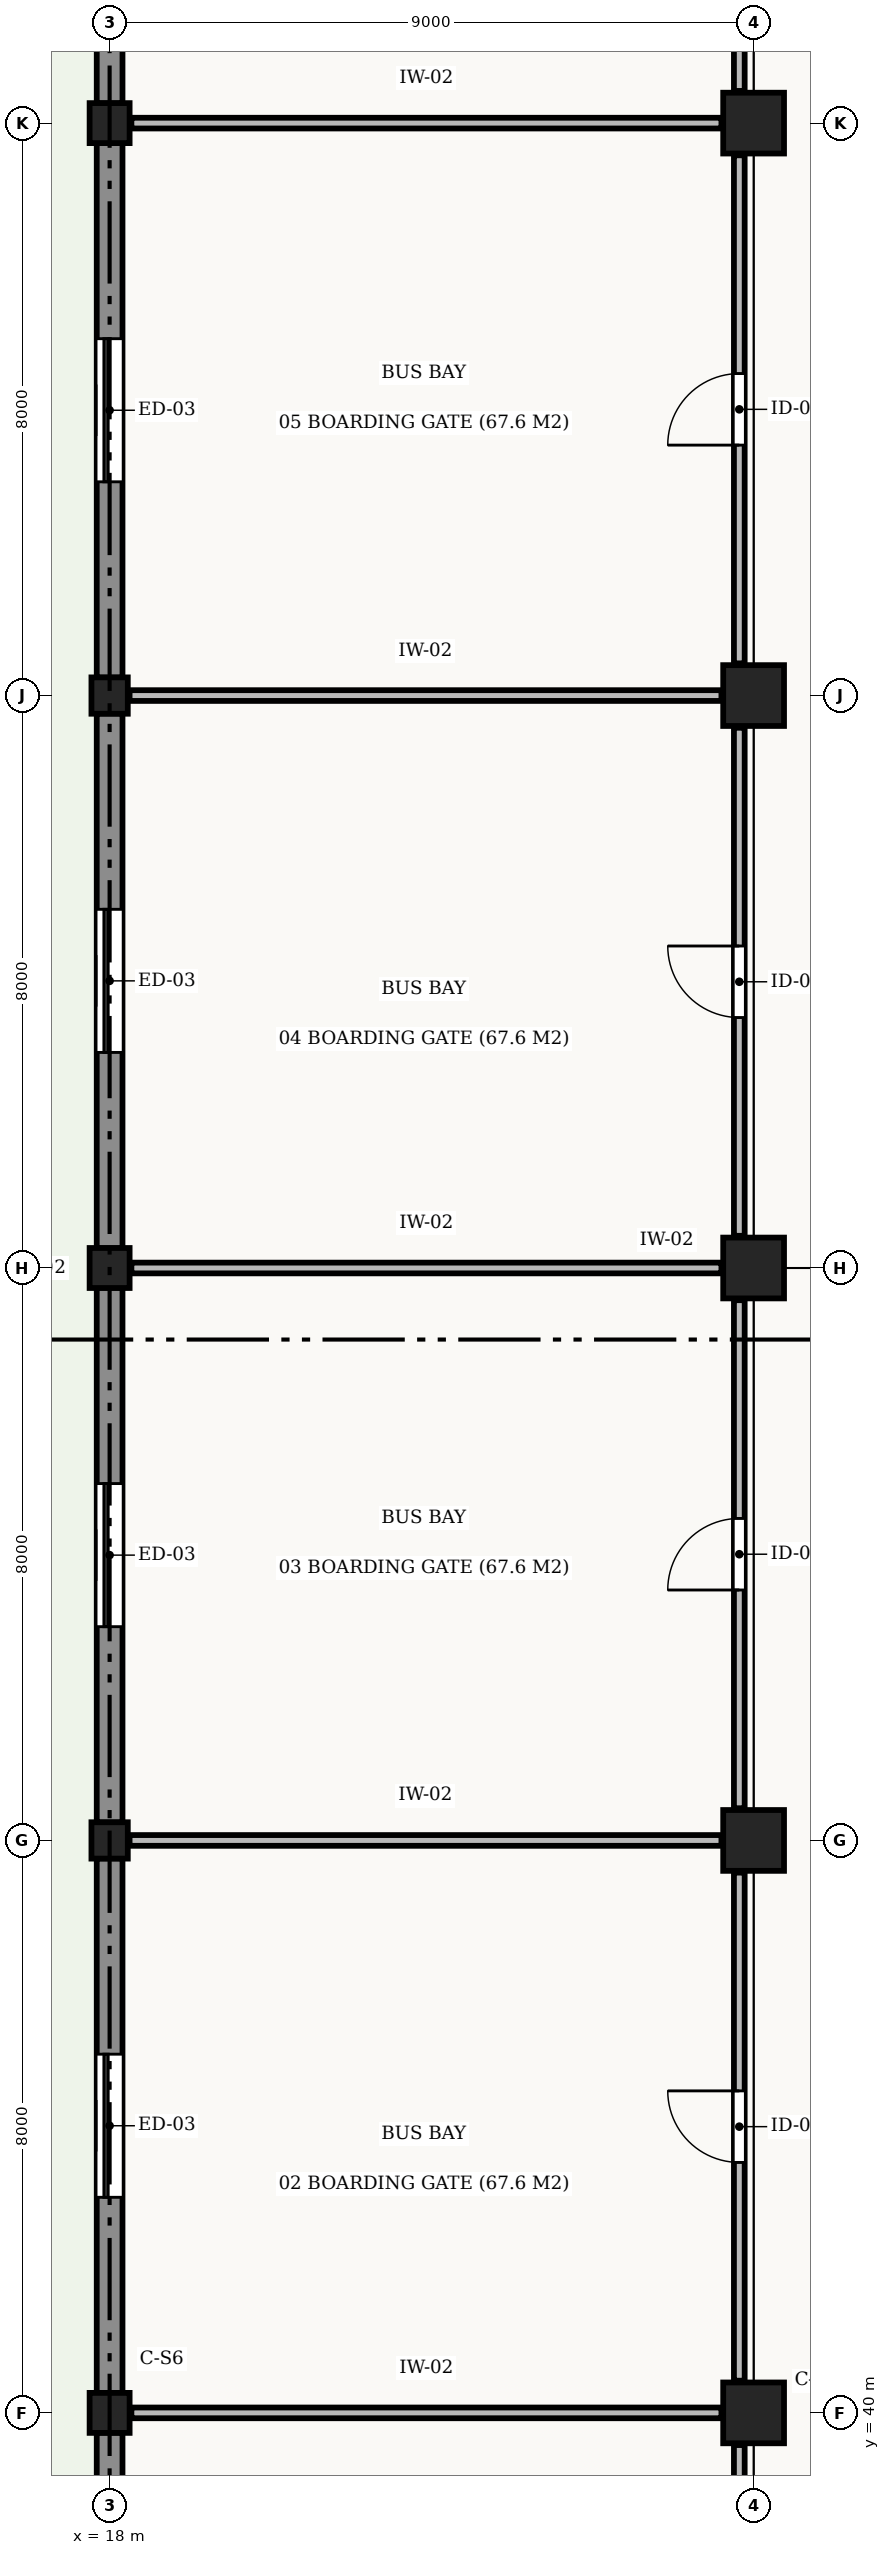
"""IFC4 building model, lengths in metres.
Left out: names, types, materials, properties, quantities, classifications, styles, units other than length and angle.
Written with IfcOpenShell. Run it as: python <this file> out.ifc"""

import sys

from ifc_helpers import new_model, si_unit, direction, frame, frame_2d, origin, origin_2d, place, context, subcontext, project, spatial, rectangle, hollow_circle, extrude, element, fill, save


model = new_model("IFC4")
c1 = context("Model", 3, precision=1e-05, world=origin(), true_north=direction((0.0, 1.0)))
c2 = subcontext(c1, "Body", "Model", "MODEL_VIEW")
j1 = project(units=[si_unit("LENGTHUNIT", "METRE"), si_unit("PLANEANGLEUNIT", "RADIAN")], contexts=[c1])
p1 = place(None, origin())
s1 = spatial("IfcSite", under=j1, at=p1, CompositionType="ELEMENT")
p2 = place(p1, origin())
s2 = spatial("IfcBuilding", under=s1, at=p2, CompositionType="ELEMENT")
p3 = place(p2, origin())
s3 = spatial("IfcBuildingStorey", under=s2, at=p3, CompositionType="ELEMENT", Elevation=0.0)
p4 = place(p3, frame((18.0, 40.0, -0.42), z_axis=(0.0, 0.0, 1.0), x_axis=(1.0, 0.0, 0.0)))
e1 = element("IfcColumn", 1, at=p4, inside=s3, PredefinedType="COLUMN", context=c2, shape_type="SweptSolid", body=[
    extrude(hollow_circle(Radius=0.28, WallThickness=0.018, at=origin_2d()), origin(), (0.0, 0.0, 1.0), 5.82),
])
p5 = place(p3, frame((18.0, 48.0, -0.42), z_axis=(0.0, 0.0, 1.0), x_axis=(1.0, 0.0, 0.0)))
e2 = element("IfcColumn", 2, at=p5, inside=s3, PredefinedType="COLUMN", context=c2, shape_type="SweptSolid", body=[
    extrude(hollow_circle(Radius=0.254, WallThickness=0.016, at=origin_2d()), origin(), (0.0, 0.0, 1.0), 5.82),
])
p6 = place(p3, frame((18.0, 56.0, -0.42), z_axis=(0.0, 0.0, 1.0), x_axis=(1.0, 0.0, 0.0)))
e3 = element("IfcColumn", 3, at=p6, inside=s3, PredefinedType="COLUMN", context=c2, shape_type="SweptSolid", body=[
    extrude(hollow_circle(Radius=0.28, WallThickness=0.018, at=origin_2d()), origin(), (0.0, 0.0, 1.0), 5.82),
])
p7 = place(p3, frame((18.0, 64.0, -0.42), z_axis=(0.0, 0.0, 1.0), x_axis=(1.0, 0.0, 0.0)))
e4 = element("IfcColumn", 4, at=p7, inside=s3, PredefinedType="COLUMN", context=c2, shape_type="SweptSolid", body=[
    extrude(hollow_circle(Radius=0.254, WallThickness=0.016, at=origin_2d()), origin(), (0.0, 0.0, 1.0), 5.82),
])
p8 = place(p3, frame((18.0, 72.0, -0.42), z_axis=(0.0, 0.0, 1.0), x_axis=(1.0, 0.0, 0.0)))
e5 = element("IfcColumn", 5, at=p8, inside=s3, PredefinedType="COLUMN", context=c2, shape_type="SweptSolid", body=[
    extrude(hollow_circle(Radius=0.28, WallThickness=0.018, at=origin_2d()), origin(), (0.0, 0.0, 1.0), 5.82),
])
for number, where, z_axis, x_axis in (
    (6, (27.0, 40.0, -0.42), (0.0, 0.0, 1.0), (1.0, 0.0, 0.0)),
    (7, (27.0, 48.0, -0.42), (0.0, 0.0, 1.0), (1.0, 0.0, 0.0)),
    (8, (27.0, 56.0, -0.42), (0.0, 0.0, 1.0), (1.0, 0.0, 0.0)),
    (9, (27.0, 64.0, -0.42), (0.0, 0.0, 1.0), (1.0, 0.0, 0.0)),
    (10, (27.0, 72.0, -0.42), (0.0, 0.0, 1.0), (1.0, 0.0, 0.0)),
):
    element("IfcColumn", number, at=place(p3, frame(where, z_axis=z_axis, x_axis=x_axis)), inside=s3, PredefinedType="COLUMN", context=c2, shape_type="SweptSolid", body=[
        extrude(rectangle(XDim=0.85, YDim=0.85, at=origin_2d()), origin(), (0.0, 0.0, 1.0), 5.82),
    ])
p9 = place(p3, frame((18.0, 32.251, 0.0), z_axis=(0.0, 0.0, 1.0), x_axis=(0.0, 1.0, 0.0)))
e11 = element("IfcWall", 11, at=p9, inside=s3, PredefinedType="STANDARD", context=c2, shape_type="SweptSolid", body=[
    extrude(rectangle(XDim=7.472, YDim=0.36, at=frame_2d((3.736, 0.0))), origin(), (0.0, 0.0, 1.0), 4.32),
])
p10 = place(p9, frame((2.736, 0.0, 0.0)))
e12 = element("IfcOpeningElement", 12, at=p10, cuts=e11, PredefinedType="OPENING", context=c2, shape_type="SweptSolid", body=[
    extrude(rectangle(XDim=2.0, YDim=2.5, at=frame_2d((1.0, 1.25))), frame((0.0, 0.192, 0.0), z_axis=(0.0, -1.0, 0.0), x_axis=(1.0, 0.0, 0.0)), (0.0, 0.0, 1.0), 0.384),
])
p11 = place(p3, frame((18.0, 40.277, 0.0), z_axis=(0.0, 0.0, 1.0), x_axis=(0.0, 1.0, 0.0)))
e13 = element("IfcWall", 13, at=p11, inside=s3, PredefinedType="STANDARD", context=c2, shape_type="SweptSolid", body=[
    extrude(rectangle(XDim=7.472, YDim=0.36, at=frame_2d((3.736, 0.0))), origin(), (0.0, 0.0, 1.0), 4.32),
])
p12 = place(p11, frame((2.736, 0.0, 0.0)))
e14 = element("IfcOpeningElement", 14, at=p12, cuts=e13, PredefinedType="OPENING", context=c2, shape_type="SweptSolid", body=[
    extrude(rectangle(XDim=2.0, YDim=2.5, at=frame_2d((1.0, 1.25))), frame((0.0, 0.192, 0.0), z_axis=(0.0, -1.0, 0.0), x_axis=(1.0, 0.0, 0.0)), (0.0, 0.0, 1.0), 0.384),
])
p13 = place(p3, frame((18.0, 48.251, 0.0), z_axis=(0.0, 0.0, 1.0), x_axis=(0.0, 1.0, 0.0)))
e15 = element("IfcWall", 15, at=p13, inside=s3, PredefinedType="STANDARD", context=c2, shape_type="SweptSolid", body=[
    extrude(rectangle(XDim=7.472, YDim=0.36, at=frame_2d((3.736, 0.0))), origin(), (0.0, 0.0, 1.0), 4.32),
])
p14 = place(p13, frame((2.736, 0.0, 0.0)))
e16 = element("IfcOpeningElement", 16, at=p14, cuts=e15, PredefinedType="OPENING", context=c2, shape_type="SweptSolid", body=[
    extrude(rectangle(XDim=2.0, YDim=2.5, at=frame_2d((1.0, 1.25))), frame((0.0, 0.192, 0.0), z_axis=(0.0, -1.0, 0.0), x_axis=(1.0, 0.0, 0.0)), (0.0, 0.0, 1.0), 0.384),
])
p15 = place(p3, frame((18.0, 56.277, 0.0), z_axis=(0.0, 0.0, 1.0), x_axis=(0.0, 1.0, 0.0)))
e17 = element("IfcWall", 17, at=p15, inside=s3, PredefinedType="STANDARD", context=c2, shape_type="SweptSolid", body=[
    extrude(rectangle(XDim=7.472, YDim=0.36, at=frame_2d((3.736, 0.0))), origin(), (0.0, 0.0, 1.0), 4.32),
])
p16 = place(p15, frame((2.736, 0.0, 0.0)))
e18 = element("IfcOpeningElement", 18, at=p16, cuts=e17, PredefinedType="OPENING", context=c2, shape_type="SweptSolid", body=[
    extrude(rectangle(XDim=2.0, YDim=2.5, at=frame_2d((1.0, 1.25))), frame((0.0, 0.192, 0.0), z_axis=(0.0, -1.0, 0.0), x_axis=(1.0, 0.0, 0.0)), (0.0, 0.0, 1.0), 0.384),
])
p17 = place(p3, frame((18.0, 64.251, 0.0), z_axis=(0.0, 0.0, 1.0), x_axis=(0.0, 1.0, 0.0)))
e19 = element("IfcWall", 19, at=p17, inside=s3, PredefinedType="STANDARD", context=c2, shape_type="SweptSolid", body=[
    extrude(rectangle(XDim=7.472, YDim=0.36, at=frame_2d((3.736, 0.0))), origin(), (0.0, 0.0, 1.0), 4.32),
])
p18 = place(p17, frame((2.736, 0.0, 0.0)))
e20 = element("IfcOpeningElement", 20, at=p18, cuts=e19, PredefinedType="OPENING", context=c2, shape_type="SweptSolid", body=[
    extrude(rectangle(XDim=2.0, YDim=2.5, at=frame_2d((1.0, 1.25))), frame((0.0, 0.192, 0.0), z_axis=(0.0, -1.0, 0.0), x_axis=(1.0, 0.0, 0.0)), (0.0, 0.0, 1.0), 0.384),
])
p19 = place(p3, frame((18.0, 72.277, 0.0), z_axis=(0.0, 0.0, 1.0), x_axis=(0.0, 1.0, 0.0)))
e21 = element("IfcWall", 21, at=p19, inside=s3, PredefinedType="STANDARD", context=c2, shape_type="SweptSolid", body=[
    extrude(rectangle(XDim=7.472, YDim=0.36, at=frame_2d((3.736, 0.0))), origin(), (0.0, 0.0, 1.0), 4.32),
])
p20 = place(p19, frame((2.736, 0.0, 0.0)))
e22 = element("IfcOpeningElement", 22, at=p20, cuts=e21, PredefinedType="OPENING", context=c2, shape_type="SweptSolid", body=[
    extrude(rectangle(XDim=2.0, YDim=2.5, at=frame_2d((1.0, 1.25))), frame((0.0, 0.192, 0.0), z_axis=(0.0, -1.0, 0.0), x_axis=(1.0, 0.0, 0.0)), (0.0, 0.0, 1.0), 0.384),
])
p21 = place(p3, frame((18.304, 40.0, 0.0), z_axis=(0.0, 0.0, 1.0), x_axis=(1.0, 0.0, 0.0)))
e23 = element("IfcWall", 23, at=p21, inside=s3, PredefinedType="STANDARD", context=c2, shape_type="SweptSolid", body=[
    extrude(rectangle(XDim=8.246, YDim=0.15, at=frame_2d((4.123, 0.0))), origin(), (0.0, 0.0, 1.0), 4.17),
])
p22 = place(p3, frame((26.8, 32.45, 0.0), z_axis=(0.0, 0.0, 1.0), x_axis=(0.0, 1.0, 0.0)))
e24 = element("IfcWall", 24, at=p22, inside=s3, PredefinedType="STANDARD", context=c2, shape_type="SweptSolid", body=[
    extrude(rectangle(XDim=7.1, YDim=0.15, at=frame_2d((3.55, 0.0))), origin(), (0.0, 0.0, 1.0), 4.17),
])
p23 = place(p22, frame((3.05, 0.0, 0.0)))
e25 = element("IfcOpeningElement", 25, at=p23, cuts=e24, PredefinedType="OPENING", context=c2, shape_type="SweptSolid", body=[
    extrude(rectangle(XDim=1.0, YDim=2.1, at=frame_2d((0.5, 1.05))), frame((0.0, 0.087, 0.0), z_axis=(0.0, -1.0, 0.0), x_axis=(1.0, 0.0, 0.0)), (0.0, 0.0, 1.0), 0.174),
])
p24 = place(p3, frame((18.279, 48.0, 0.0), z_axis=(0.0, 0.0, 1.0), x_axis=(1.0, 0.0, 0.0)))
e26 = element("IfcWall", 26, at=p24, inside=s3, PredefinedType="STANDARD", context=c2, shape_type="SweptSolid", body=[
    extrude(rectangle(XDim=8.271, YDim=0.15, at=frame_2d((4.135, 0.0))), origin(), (0.0, 0.0, 1.0), 4.17),
])
p25 = place(p3, frame((26.8, 40.45, 0.0), z_axis=(0.0, 0.0, 1.0), x_axis=(0.0, 1.0, 0.0)))
e27 = element("IfcWall", 27, at=p25, inside=s3, PredefinedType="STANDARD", context=c2, shape_type="SweptSolid", body=[
    extrude(rectangle(XDim=7.1, YDim=0.15, at=frame_2d((3.55, 0.0))), origin(), (0.0, 0.0, 1.0), 4.27),
])
p26 = place(p25, frame((3.05, 0.0, 0.0)))
e28 = element("IfcOpeningElement", 28, at=p26, cuts=e27, PredefinedType="OPENING", context=c2, shape_type="SweptSolid", body=[
    extrude(rectangle(XDim=1.0, YDim=2.1, at=frame_2d((0.5, 1.05))), frame((0.0, 0.087, 0.0), z_axis=(0.0, -1.0, 0.0), x_axis=(1.0, 0.0, 0.0)), (0.0, 0.0, 1.0), 0.174),
])
p27 = place(p3, frame((18.304, 56.0, 0.0), z_axis=(0.0, 0.0, 1.0), x_axis=(1.0, 0.0, 0.0)))
e29 = element("IfcWall", 29, at=p27, inside=s3, PredefinedType="STANDARD", context=c2, shape_type="SweptSolid", body=[
    extrude(rectangle(XDim=8.246, YDim=0.15, at=frame_2d((4.123, 0.0))), origin(), (0.0, 0.0, 1.0), 4.17),
])
p28 = place(p3, frame((26.8, 48.45, 0.0), z_axis=(0.0, 0.0, 1.0), x_axis=(0.0, 1.0, 0.0)))
e30 = element("IfcWall", 30, at=p28, inside=s3, PredefinedType="STANDARD", context=c2, shape_type="SweptSolid", body=[
    extrude(rectangle(XDim=7.1, YDim=0.15, at=frame_2d((3.55, 0.0))), origin(), (0.0, 0.0, 1.0), 4.27),
])
p29 = place(p28, frame((3.05, 0.0, 0.0)))
e31 = element("IfcOpeningElement", 31, at=p29, cuts=e30, PredefinedType="OPENING", context=c2, shape_type="SweptSolid", body=[
    extrude(rectangle(XDim=1.0, YDim=2.1, at=frame_2d((0.5, 1.05))), frame((0.0, 0.087, 0.0), z_axis=(0.0, -1.0, 0.0), x_axis=(1.0, 0.0, 0.0)), (0.0, 0.0, 1.0), 0.174),
])
p30 = place(p3, frame((18.279, 64.0, 0.0), z_axis=(0.0, 0.0, 1.0), x_axis=(1.0, 0.0, 0.0)))
e32 = element("IfcWall", 32, at=p30, inside=s3, PredefinedType="STANDARD", context=c2, shape_type="SweptSolid", body=[
    extrude(rectangle(XDim=8.271, YDim=0.15, at=frame_2d((4.135, 0.0))), origin(), (0.0, 0.0, 1.0), 4.17),
])
p31 = place(p3, frame((26.8, 56.45, 0.0), z_axis=(0.0, 0.0, 1.0), x_axis=(0.0, 1.0, 0.0)))
e33 = element("IfcWall", 33, at=p31, inside=s3, PredefinedType="STANDARD", context=c2, shape_type="SweptSolid", body=[
    extrude(rectangle(XDim=7.1, YDim=0.15, at=frame_2d((3.55, 0.0))), origin(), (0.0, 0.0, 1.0), 4.27),
])
p32 = place(p31, frame((3.05, 0.0, 0.0)))
e34 = element("IfcOpeningElement", 34, at=p32, cuts=e33, PredefinedType="OPENING", context=c2, shape_type="SweptSolid", body=[
    extrude(rectangle(XDim=1.0, YDim=2.1, at=frame_2d((0.5, 1.05))), frame((0.0, 0.087, 0.0), z_axis=(0.0, -1.0, 0.0), x_axis=(1.0, 0.0, 0.0)), (0.0, 0.0, 1.0), 0.174),
])
p33 = place(p3, frame((18.304, 72.0, 0.0), z_axis=(0.0, 0.0, 1.0), x_axis=(1.0, 0.0, 0.0)))
e35 = element("IfcWall", 35, at=p33, inside=s3, PredefinedType="STANDARD", context=c2, shape_type="SweptSolid", body=[
    extrude(rectangle(XDim=8.246, YDim=0.15, at=frame_2d((4.123, 0.0))), origin(), (0.0, 0.0, 1.0), 4.17),
])
p34 = place(p3, frame((26.8, 64.45, 0.0), z_axis=(0.0, 0.0, 1.0), x_axis=(0.0, 1.0, 0.0)))
e36 = element("IfcWall", 36, at=p34, inside=s3, PredefinedType="STANDARD", context=c2, shape_type="SweptSolid", body=[
    extrude(rectangle(XDim=7.1, YDim=0.15, at=frame_2d((3.55, 0.0))), origin(), (0.0, 0.0, 1.0), 4.17),
])
p35 = place(p34, frame((3.05, 0.0, 0.0)))
e37 = element("IfcOpeningElement", 37, at=p35, cuts=e36, PredefinedType="OPENING", context=c2, shape_type="SweptSolid", body=[
    extrude(rectangle(XDim=1.0, YDim=2.1, at=frame_2d((0.5, 1.05))), frame((0.0, 0.087, 0.0), z_axis=(0.0, -1.0, 0.0), x_axis=(1.0, 0.0, 0.0)), (0.0, 0.0, 1.0), 0.174),
])
p36 = place(p3, frame((26.8, 72.45, 0.0), z_axis=(0.0, 0.0, 1.0), x_axis=(0.0, 1.0, 0.0)))
e38 = element("IfcWall", 38, at=p36, inside=s3, PredefinedType="STANDARD", context=c2, shape_type="SweptSolid", body=[
    extrude(rectangle(XDim=7.1, YDim=0.15, at=frame_2d((3.55, 0.0))), origin(), (0.0, 0.0, 1.0), 4.27),
])
p37 = place(p36, frame((3.05, 0.0, 0.0)))
e39 = element("IfcOpeningElement", 39, at=p37, cuts=e38, PredefinedType="OPENING", context=c2, shape_type="SweptSolid", body=[
    extrude(rectangle(XDim=1.0, YDim=2.1, at=frame_2d((0.5, 1.05))), frame((0.0, 0.087, 0.0), z_axis=(0.0, -1.0, 0.0), x_axis=(1.0, 0.0, 0.0)), (0.0, 0.0, 1.0), 0.174),
])
p38 = place(p12, origin())
e40 = element("IfcDoor", 40, at=p38, inside=s3, OperationType="SINGLE_SWING_LEFT", PredefinedType="DOOR", context=c2, shape_type="SweptSolid", body=[
    extrude(rectangle(XDim=2.0, YDim=2.5, at=frame_2d((1.0, 1.25))), frame((0.0, 0.025, 0.0), z_axis=(0.0, -1.0, 0.0), x_axis=(1.0, 0.0, 0.0)), (0.0, 0.0, 1.0), 0.05),
])
fill(e14, e40)
p39 = place(p14, origin())
e41 = element("IfcDoor", 41, at=p39, inside=s3, OperationType="SINGLE_SWING_LEFT", PredefinedType="DOOR", context=c2, shape_type="SweptSolid", body=[
    extrude(rectangle(XDim=2.0, YDim=2.5, at=frame_2d((1.0, 1.25))), frame((0.0, 0.025, 0.0), z_axis=(0.0, -1.0, 0.0), x_axis=(1.0, 0.0, 0.0)), (0.0, 0.0, 1.0), 0.05),
])
fill(e16, e41)
p40 = place(p16, origin())
e42 = element("IfcDoor", 42, at=p40, inside=s3, OperationType="SINGLE_SWING_LEFT", PredefinedType="DOOR", context=c2, shape_type="SweptSolid", body=[
    extrude(rectangle(XDim=2.0, YDim=2.5, at=frame_2d((1.0, 1.25))), frame((0.0, 0.025, 0.0), z_axis=(0.0, -1.0, 0.0), x_axis=(1.0, 0.0, 0.0)), (0.0, 0.0, 1.0), 0.05),
])
fill(e18, e42)
p41 = place(p18, origin())
e43 = element("IfcDoor", 43, at=p41, inside=s3, OperationType="SINGLE_SWING_LEFT", PredefinedType="DOOR", context=c2, shape_type="SweptSolid", body=[
    extrude(rectangle(XDim=2.0, YDim=2.5, at=frame_2d((1.0, 1.25))), frame((0.0, 0.025, 0.0), z_axis=(0.0, -1.0, 0.0), x_axis=(1.0, 0.0, 0.0)), (0.0, 0.0, 1.0), 0.05),
])
fill(e20, e43)
p42 = place(p26, origin())
e44 = element("IfcDoor", 44, at=p42, inside=s3, OperationType="SINGLE_SWING_RIGHT", PredefinedType="DOOR", context=c2, shape_type="SweptSolid", body=[
    extrude(rectangle(XDim=1.0, YDim=2.1, at=frame_2d((0.5, 1.05))), frame((0.0, 0.025, 0.0), z_axis=(0.0, -1.0, 0.0), x_axis=(1.0, 0.0, 0.0)), (0.0, 0.0, 1.0), 0.05),
])
fill(e28, e44)
p43 = place(p29, origin())
e45 = element("IfcDoor", 45, at=p43, inside=s3, OperationType="SINGLE_SWING_LEFT", PredefinedType="DOOR", context=c2, shape_type="SweptSolid", body=[
    extrude(rectangle(XDim=1.0, YDim=2.1, at=frame_2d((0.5, 1.05))), frame((0.0, 0.025, 0.0), z_axis=(0.0, -1.0, 0.0), x_axis=(1.0, 0.0, 0.0)), (0.0, 0.0, 1.0), 0.05),
])
fill(e31, e45)
p44 = place(p32, origin())
e46 = element("IfcDoor", 46, at=p44, inside=s3, OperationType="SINGLE_SWING_RIGHT", PredefinedType="DOOR", context=c2, shape_type="SweptSolid", body=[
    extrude(rectangle(XDim=1.0, YDim=2.1, at=frame_2d((0.5, 1.05))), frame((0.0, 0.025, 0.0), z_axis=(0.0, -1.0, 0.0), x_axis=(1.0, 0.0, 0.0)), (0.0, 0.0, 1.0), 0.05),
])
fill(e34, e46)
p45 = place(p35, origin())
e47 = element("IfcDoor", 47, at=p45, inside=s3, OperationType="SINGLE_SWING_LEFT", PredefinedType="DOOR", context=c2, shape_type="SweptSolid", body=[
    extrude(rectangle(XDim=1.0, YDim=2.1, at=frame_2d((0.5, 1.05))), frame((0.0, 0.025, 0.0), z_axis=(0.0, -1.0, 0.0), x_axis=(1.0, 0.0, 0.0)), (0.0, 0.0, 1.0), 0.05),
])
fill(e37, e47)
save(model, sys.argv[1])
